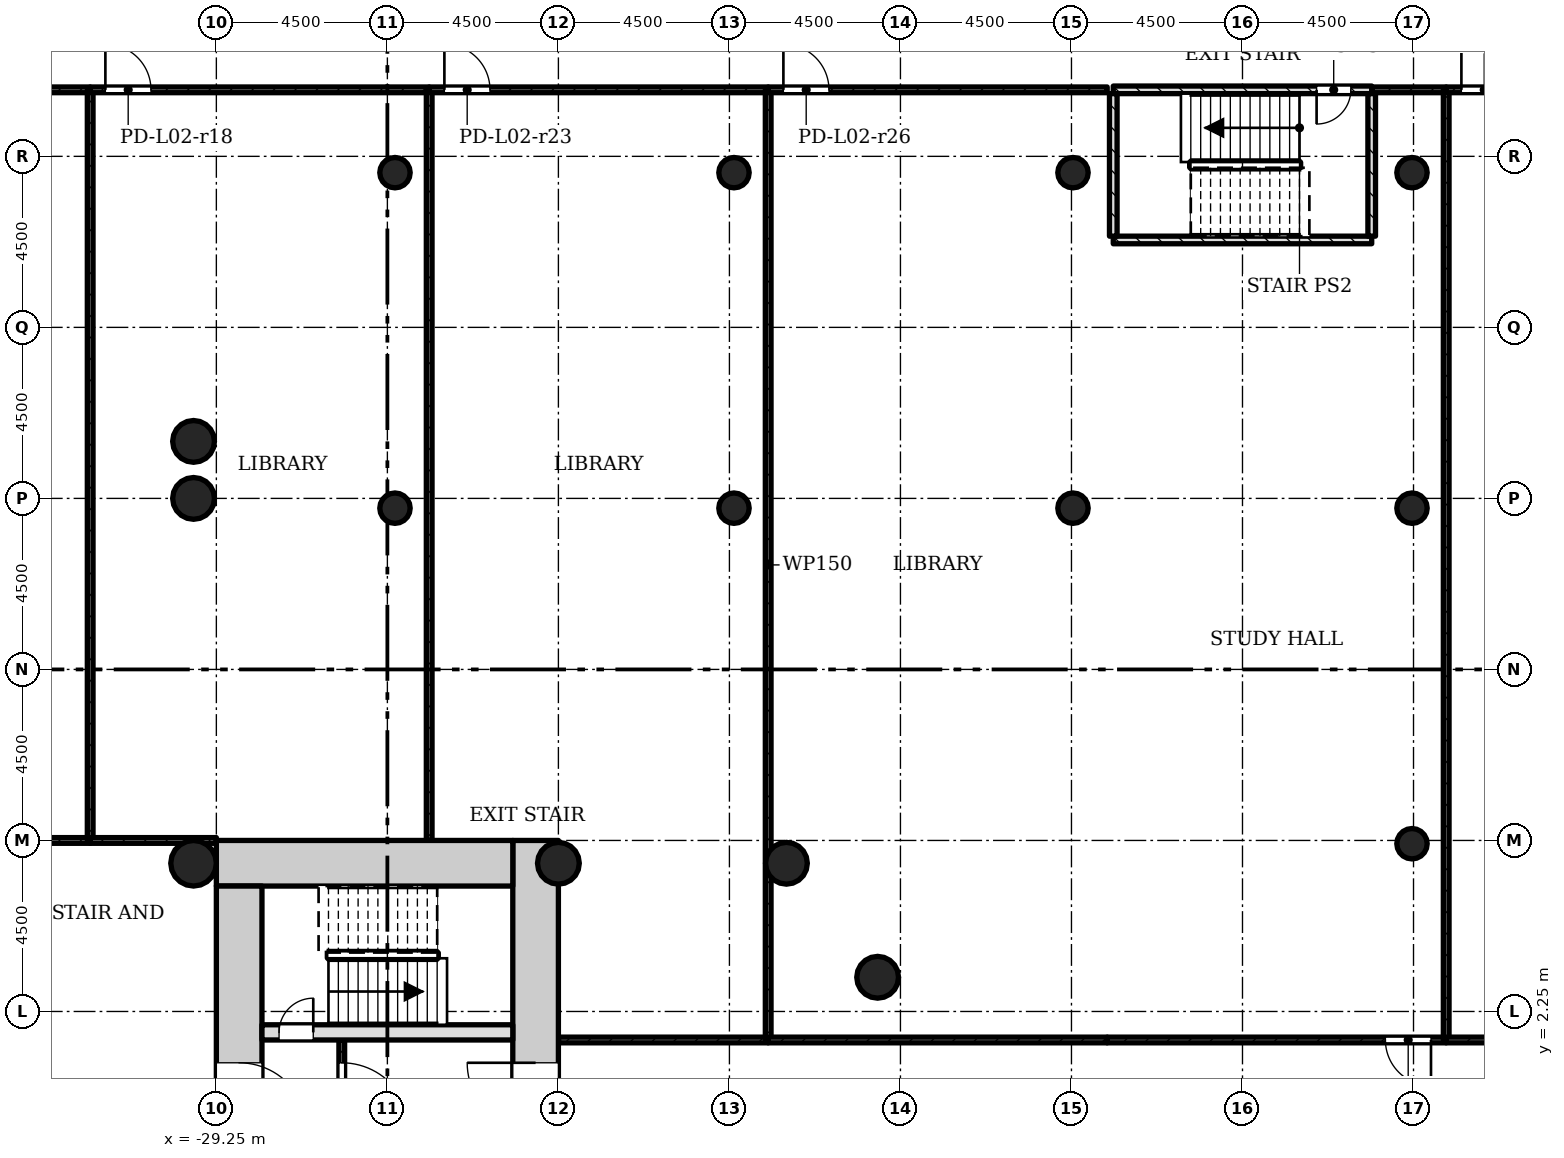
"""IFC4 building model, lengths in metres.
Left out: names, types, materials, properties, quantities, classifications, styles, units other than length and angle.
Written with IfcOpenShell. Run it as: python <this file> out.ifc"""

import sys

from ifc_helpers import new_model, si_unit, direction, frame, frame_2d, origin, origin_2d, place, context, subcontext, project, spatial, rectangle, hollow_circle, extrude, element, fill, save


model = new_model("IFC4")
c1 = context("Model", 3, precision=1e-05, world=origin(), true_north=direction((0.0, 1.0)))
c2 = subcontext(c1, "Body", "Model", "MODEL_VIEW")
j1 = project(units=[si_unit("LENGTHUNIT", "METRE"), si_unit("PLANEANGLEUNIT", "RADIAN")], contexts=[c1])
p1 = place(None, origin())
s1 = spatial("IfcSite", under=j1, at=p1, CompositionType="ELEMENT")
p2 = place(p1, origin())
s2 = spatial("IfcBuilding", under=s1, at=p2, CompositionType="ELEMENT")
p3 = place(p2, frame((0.0, 0.0, 11.0)))
s3 = spatial("IfcBuildingStorey", under=s2, at=p3, CompositionType="ELEMENT", Elevation=11.0)
p4 = place(p3, frame((-20.85, -5.55, 0.0), z_axis=(0.0, 0.0, 1.0), x_axis=(0.0, 1.0, 0.0)))
e1 = element("IfcWall", 1, at=p4, inside=s3, PredefinedType="SHEAR", context=c2, shape_type="SweptSolid", body=[
    extrude(rectangle(XDim=12.3, YDim=1.2, at=frame_2d((6.15, 0.0))), origin(), (0.0, 0.0, 1.0), 4.5),
])
p5 = place(p4, frame((4.65, 0.0, 0.0)))
e2 = element("IfcOpeningElement", 2, at=p5, cuts=e1, PredefinedType="OPENING", context=c2, shape_type="SweptSolid", body=[
    extrude(rectangle(XDim=1.8, YDim=2.1, at=frame_2d((0.9, 1.05))), frame((0.0, 0.61, 0.0), z_axis=(0.0, -1.0, 0.0), x_axis=(1.0, 0.0, 0.0)), (0.0, 0.0, 1.0), 1.22),
])
p6 = place(p3, frame((-21.45, 6.15, 0.0), z_axis=(0.0, 0.0, 1.0), x_axis=(-1.0, 0.0, 0.0)))
e3 = element("IfcWall", 3, at=p6, inside=s3, PredefinedType="SHEAR", context=c2, shape_type="SweptSolid", body=[
    extrude(rectangle(XDim=7.8, YDim=1.2, at=frame_2d((3.9, 0.0))), origin(), (0.0, 0.0, 1.0), 4.5),
])
p7 = place(p3, frame((-28.65, 5.55, 0.0), z_axis=(0.0, 0.0, 1.0), x_axis=(0.0, -1.0, 0.0)))
e4 = element("IfcWall", 4, at=p7, inside=s3, PredefinedType="SHEAR", context=c2, shape_type="SweptSolid", body=[
    extrude(rectangle(XDim=12.3, YDim=1.2, at=frame_2d((6.15, 0.0))), origin(), (0.0, 0.0, 1.0), 4.5),
])
p8 = place(p7, frame((4.65, 0.0, 0.0)))
e5 = element("IfcOpeningElement", 5, at=p8, cuts=e4, PredefinedType="OPENING", context=c2, shape_type="SweptSolid", body=[
    extrude(rectangle(XDim=1.8, YDim=2.1, at=frame_2d((0.9, 1.05))), frame((0.0, 0.61, 0.0), z_axis=(0.0, -1.0, 0.0), x_axis=(1.0, 0.0, 0.0)), (0.0, 0.0, 1.0), 1.22),
])
p9 = place(p3, frame((-28.05, 1.7, 0.0), z_axis=(0.0, 0.0, 1.0), x_axis=(1.0, 0.0, 0.0)))
e6 = element("IfcWall", 6, at=p9, inside=s3, PredefinedType="SHEAR", context=c2, shape_type="SweptSolid", body=[
    extrude(rectangle(XDim=6.6, YDim=0.4, at=frame_2d((3.3, 0.0))), origin(), (0.0, 0.0, 1.0), 4.5),
])
p10 = place(p9, frame((0.45, 0.0, 0.0)))
e7 = element("IfcOpeningElement", 7, at=p10, cuts=e6, PredefinedType="OPENING", context=c2, shape_type="SweptSolid", body=[
    extrude(rectangle(XDim=0.9, YDim=2.1, at=frame_2d((0.45, 1.05))), frame((0.0, 0.21, 0.0), z_axis=(0.0, -1.0, 0.0), x_axis=(1.0, 0.0, 0.0)), (0.0, 0.0, 1.0), 0.42),
])
for number, where, z_axis, x_axis in (
    (8, (-20.25, 6.15, 0.0), (0.0, 0.0, 1.0), (1.0, 0.0, 0.0)),
    (9, (-14.25, 6.15, 0.0), (0.0, 0.0, 1.0), (1.0, 0.0, 0.0)),
    (10, (-11.85, 3.15, 0.0), (0.0, 0.0, 1.0), (1.0, 0.0, 0.0)),
    (11, (-29.85, 15.75, 0.0), (0.0, 0.0, 1.0), (1.0, 0.0, 0.0)),
    (12, (-29.85, 17.25, 0.0), (0.0, 0.0, 1.0), (1.0, 0.0, 0.0)),
):
    element("IfcColumn", number, at=place(p3, frame(where, z_axis=z_axis, x_axis=x_axis)), inside=s3, PredefinedType="COLUMN", context=c2, shape_type="SweptSolid", body=[
        extrude(hollow_circle(Radius=0.55, WallThickness=0.04, at=origin_2d()), origin(), (0.0, 0.0, 1.0), 4.5),
    ])
p11 = place(p3, frame((-29.85, 6.15, 0.0), z_axis=(0.0, 0.0, 1.0), x_axis=(1.0, 0.0, 0.0)))
e13 = element("IfcColumn", 13, at=p11, inside=s3, PredefinedType="COLUMN", context=c2, shape_type="SweptSolid", body=[
    extrude(hollow_circle(Radius=0.6, WallThickness=0.045, at=origin_2d()), origin(), (0.0, 0.0, 1.0), 4.5),
])
for number, where, z_axis, x_axis in (
    (14, (2.21, 6.664, 0.0), (0.0, 0.0, 1.0), (1.0, 0.0, 0.0)),
    (15, (-24.55, 15.493, 0.0), (0.0, 0.0, 1.0), (1.0, 0.0, 0.0)),
    (16, (-15.63, 15.493, 0.0), (0.0, 0.0, 1.0), (1.0, 0.0, 0.0)),
    (17, (-6.71, 15.493, 0.0), (0.0, 0.0, 1.0), (1.0, 0.0, 0.0)),
    (18, (2.21, 15.493, 0.0), (0.0, 0.0, 1.0), (1.0, 0.0, 0.0)),
    (19, (-24.55, 24.321, 0.0), (0.0, 0.0, 1.0), (1.0, 0.0, 0.0)),
    (20, (-15.63, 24.321, 0.0), (0.0, 0.0, 1.0), (1.0, 0.0, 0.0)),
    (21, (-6.71, 24.321, 0.0), (0.0, 0.0, 1.0), (1.0, 0.0, 0.0)),
    (22, (2.21, 24.321, 0.0), (0.0, 0.0, 1.0), (1.0, 0.0, 0.0)),
):
    element("IfcColumn", number, at=place(p3, frame(where, z_axis=z_axis, x_axis=x_axis)), inside=s3, PredefinedType="COLUMN", context=c2, shape_type="SweptSolid", body=[
        extrude(hollow_circle(Radius=0.4, WallThickness=0.028, at=origin_2d()), origin(), (0.0, 0.0, 1.0), 4.5),
    ])
p12 = place(p3, frame((-25.95, -1.5, 0.0), z_axis=(0.0, 0.0, 1.0), x_axis=(0.0, 1.0, 0.0)))
e23 = element("IfcWall", 23, at=p12, inside=s3, PredefinedType="PARTITIONING", context=c2, shape_type="SweptSolid", body=[
    extrude(rectangle(XDim=3.0, YDim=0.15, at=frame_2d((1.5, 0.0))), origin(), (0.0, 0.0, 1.0), 4.08),
])
p13 = place(p12, frame((0.6, 0.0, 0.0)))
e24 = element("IfcOpeningElement", 24, at=p13, cuts=e23, PredefinedType="OPENING", context=c2, shape_type="SweptSolid", body=[
    extrude(rectangle(XDim=1.8, YDim=2.1, at=frame_2d((0.9, 1.05))), frame((0.0, 0.085, 0.0), z_axis=(0.0, -1.0, 0.0), x_axis=(1.0, 0.0, 0.0)), (0.0, 0.0, 1.0), 0.17),
])
p14 = place(p3, frame((-41.49, 26.5, 0.0), z_axis=(0.0, 0.0, 1.0), x_axis=(1.0, 0.0, 0.0)))
e25 = element("IfcWall", 25, at=p14, inside=s3, PredefinedType="PARTITIONING", context=c2, shape_type="SweptSolid", body=[
    extrude(rectangle(XDim=8.92, YDim=0.15, at=frame_2d((4.46, 0.0))), origin(), (0.0, 0.0, 1.0), 4.08),
])
p15 = place(p14, frame((0.4, 0.0, 0.0)))
e26 = element("IfcOpeningElement", 26, at=p15, cuts=e25, PredefinedType="OPENING", context=c2, shape_type="SweptSolid", body=[
    extrude(rectangle(XDim=1.2, YDim=2.1, at=frame_2d((0.6, 1.05))), frame((0.0, 0.085, 0.0), z_axis=(0.0, -1.0, 0.0), x_axis=(1.0, 0.0, 0.0)), (0.0, 0.0, 1.0), 0.17),
])
p16 = place(p3, frame((-32.57, 6.75, 0.0), z_axis=(0.0, 0.0, 1.0), x_axis=(-1.0, 0.0, 0.0)))
e27 = element("IfcWall", 27, at=p16, inside=s3, PredefinedType="PARTITIONING", context=c2, shape_type="SweptSolid", body=[
    extrude(rectangle(XDim=8.92, YDim=0.15, at=frame_2d((4.46, 0.0))), origin(), (0.0, 0.0, 1.0), 4.08),
])
p17 = place(p3, frame((-32.57, 26.5, 0.0), z_axis=(0.0, 0.0, 1.0), x_axis=(0.0, -1.0, 0.0)))
e28 = element("IfcWall", 28, at=p17, inside=s3, PredefinedType="PARTITIONING", context=c2, shape_type="SweptSolid", body=[
    extrude(rectangle(XDim=19.75, YDim=0.15, at=frame_2d((9.875, 0.0))), origin(), (0.0, 0.0, 1.0), 4.08),
])
p18 = place(p3, frame((-29.25, 6.75, 0.0), z_axis=(0.0, 0.0, 1.0), x_axis=(-1.0, 0.0, 0.0)))
e29 = element("IfcWall", 29, at=p18, inside=s3, PredefinedType="PARTITIONING", context=c2, shape_type="SweptSolid", body=[
    extrude(rectangle(XDim=3.32, YDim=0.15, at=frame_2d((1.66, 0.0))), origin(), (0.0, 0.0, 1.0), 4.08),
])
p19 = place(p3, frame((-32.57, 26.5, 0.0), z_axis=(0.0, 0.0, 1.0), x_axis=(1.0, 0.0, 0.0)))
e30 = element("IfcWall", 30, at=p19, inside=s3, PredefinedType="PARTITIONING", context=c2, shape_type="SweptSolid", body=[
    extrude(rectangle(XDim=8.92, YDim=0.15, at=frame_2d((4.46, 0.0))), origin(), (0.0, 0.0, 1.0), 4.08),
])
p20 = place(p19, frame((0.4, 0.0, 0.0)))
e31 = element("IfcOpeningElement", 31, at=p20, cuts=e30, PredefinedType="OPENING", context=c2, shape_type="SweptSolid", body=[
    extrude(rectangle(XDim=1.2, YDim=2.1, at=frame_2d((0.6, 1.05))), frame((0.0, 0.085, 0.0), z_axis=(0.0, -1.0, 0.0), x_axis=(1.0, 0.0, 0.0)), (0.0, 0.0, 1.0), 0.17),
])
p21 = place(p3, frame((-23.65, 26.5, 0.0), z_axis=(0.0, 0.0, 1.0), x_axis=(0.0, -1.0, 0.0)))
e32 = element("IfcWall", 32, at=p21, inside=s3, PredefinedType="PARTITIONING", context=c2, shape_type="SweptSolid", body=[
    extrude(rectangle(XDim=19.75, YDim=0.15, at=frame_2d((9.875, 0.0))), origin(), (0.0, 0.0, 1.0), 4.08),
])
p22 = place(p3, frame((-23.65, 26.5, 0.0), z_axis=(0.0, 0.0, 1.0), x_axis=(1.0, 0.0, 0.0)))
e33 = element("IfcWall", 33, at=p22, inside=s3, PredefinedType="PARTITIONING", context=c2, shape_type="SweptSolid", body=[
    extrude(rectangle(XDim=8.92, YDim=0.15, at=frame_2d((4.46, 0.0))), origin(), (0.0, 0.0, 1.0), 4.08),
])
p23 = place(p22, frame((0.4, 0.0, 0.0)))
e34 = element("IfcOpeningElement", 34, at=p23, cuts=e33, PredefinedType="OPENING", context=c2, shape_type="SweptSolid", body=[
    extrude(rectangle(XDim=1.2, YDim=2.1, at=frame_2d((0.6, 1.05))), frame((0.0, 0.085, 0.0), z_axis=(0.0, -1.0, 0.0), x_axis=(1.0, 0.0, 0.0)), (0.0, 0.0, 1.0), 0.17),
])
p24 = place(p3, frame((-14.73, 1.5, 0.0), z_axis=(0.0, 0.0, 1.0), x_axis=(-1.0, 0.0, 0.0)))
e35 = element("IfcWall", 35, at=p24, inside=s3, PredefinedType="PARTITIONING", context=c2, shape_type="SweptSolid", body=[
    extrude(rectangle(XDim=5.52, YDim=0.15, at=frame_2d((2.76, 0.0))), origin(), (0.0, 0.0, 1.0), 4.08),
])
p25 = place(p3, frame((-14.73, 26.5, 0.0), z_axis=(0.0, 0.0, 1.0), x_axis=(0.0, -1.0, 0.0)))
e36 = element("IfcWall", 36, at=p25, inside=s3, PredefinedType="PARTITIONING", context=c2, shape_type="SweptSolid", body=[
    extrude(rectangle(XDim=25.0, YDim=0.15, at=frame_2d((12.5, 0.0))), origin(), (0.0, 0.0, 1.0), 4.08),
])
p26 = place(p3, frame((-14.73, 26.5, 0.0), z_axis=(0.0, 0.0, 1.0), x_axis=(1.0, 0.0, 0.0)))
e37 = element("IfcWall", 37, at=p26, inside=s3, PredefinedType="PARTITIONING", context=c2, shape_type="SweptSolid", body=[
    extrude(rectangle(XDim=8.92, YDim=0.15, at=frame_2d((4.46, 0.0))), origin(), (0.0, 0.0, 1.0), 4.08),
])
p27 = place(p26, frame((0.4, 0.0, 0.0)))
e38 = element("IfcOpeningElement", 38, at=p27, cuts=e37, PredefinedType="OPENING", context=c2, shape_type="SweptSolid", body=[
    extrude(rectangle(XDim=1.2, YDim=2.1, at=frame_2d((0.6, 1.05))), frame((0.0, 0.085, 0.0), z_axis=(0.0, -1.0, 0.0), x_axis=(1.0, 0.0, 0.0)), (0.0, 0.0, 1.0), 0.17),
])
p28 = place(p3, frame((-5.81, 1.5, 0.0), z_axis=(0.0, 0.0, 1.0), x_axis=(-1.0, 0.0, 0.0)))
e39 = element("IfcWall", 39, at=p28, inside=s3, PredefinedType="PARTITIONING", context=c2, shape_type="SweptSolid", body=[
    extrude(rectangle(XDim=8.92, YDim=0.15, at=frame_2d((4.46, 0.0))), origin(), (0.0, 0.0, 1.0), 4.08),
])
p29 = place(p3, frame((-5.65, 26.5, 0.0), z_axis=(0.0, 0.0, 1.0), x_axis=(1.0, 0.0, 0.0)))
e40 = element("IfcWall", 40, at=p29, inside=s3, PredefinedType="SHEAR", context=c2, shape_type="SweptSolid", body=[
    extrude(rectangle(XDim=6.8, YDim=0.2, at=frame_2d((3.4, 0.0))), origin(), (0.0, 0.0, 1.0), 4.08),
])
p30 = place(p29, frame((5.35, 0.0, 0.0)))
e41 = element("IfcOpeningElement", 41, at=p30, cuts=e40, PredefinedType="OPENING", context=c2, shape_type="SweptSolid", body=[
    extrude(rectangle(XDim=0.9, YDim=2.1, at=frame_2d((0.45, 1.05))), frame((0.0, 0.11, 0.0), z_axis=(0.0, -1.0, 0.0), x_axis=(1.0, 0.0, 0.0)), (0.0, 0.0, 1.0), 0.22),
])
p31 = place(p3, frame((-5.65, 22.55, 0.0), z_axis=(0.0, 0.0, 1.0), x_axis=(1.0, 0.0, 0.0)))
e42 = element("IfcWall", 42, at=p31, inside=s3, PredefinedType="SHEAR", context=c2, shape_type="SweptSolid", body=[
    extrude(rectangle(XDim=6.8, YDim=0.2, at=frame_2d((3.4, 0.0))), origin(), (0.0, 0.0, 1.0), 4.08),
])
for number, where, z_axis, x_axis in (
    (43, (-5.65, 22.65, 0.0), (0.0, 0.0, 1.0), (0.0, 1.0, 0.0)),
    (44, (1.15, 22.65, 0.0), (0.0, 0.0, 1.0), (0.0, 1.0, 0.0)),
):
    element("IfcWall", number, at=place(p3, frame(where, z_axis=z_axis, x_axis=x_axis)), inside=s3, PredefinedType="SHEAR", context=c2, shape_type="SweptSolid", body=[
        extrude(rectangle(XDim=3.75, YDim=0.2, at=frame_2d((1.875, 0.0))), origin(), (0.0, 0.0, 1.0), 4.08),
    ])
p32 = place(p3, frame((1.15, 26.5, 0.0), z_axis=(0.0, 0.0, 1.0), x_axis=(1.0, 0.0, 0.0)))
e45 = element("IfcWall", 45, at=p32, inside=s3, PredefinedType="PARTITIONING", context=c2, shape_type="SweptSolid", body=[
    extrude(rectangle(XDim=1.96, YDim=0.15, at=frame_2d((0.98, 0.0))), origin(), (0.0, 0.0, 1.0), 4.08),
])
p33 = place(p3, frame((3.11, 1.5, 0.0), z_axis=(0.0, 0.0, 1.0), x_axis=(-1.0, 0.0, 0.0)))
e46 = element("IfcWall", 46, at=p33, inside=s3, PredefinedType="PARTITIONING", context=c2, shape_type="SweptSolid", body=[
    extrude(rectangle(XDim=8.92, YDim=0.15, at=frame_2d((4.46, 0.0))), origin(), (0.0, 0.0, 1.0), 4.08),
])
p34 = place(p33, frame((0.4, 0.0, 0.0)))
e47 = element("IfcOpeningElement", 47, at=p34, cuts=e46, PredefinedType="OPENING", context=c2, shape_type="SweptSolid", body=[
    extrude(rectangle(XDim=1.2, YDim=2.1, at=frame_2d((0.6, 1.05))), frame((0.0, 0.085, 0.0), z_axis=(0.0, -1.0, 0.0), x_axis=(1.0, 0.0, 0.0)), (0.0, 0.0, 1.0), 0.17),
])
p35 = place(p3, frame((3.11, 26.5, 0.0), z_axis=(0.0, 0.0, 1.0), x_axis=(0.0, -1.0, 0.0)))
e48 = element("IfcWall", 48, at=p35, inside=s3, PredefinedType="PARTITIONING", context=c2, shape_type="SweptSolid", body=[
    extrude(rectangle(XDim=25.0, YDim=0.15, at=frame_2d((12.5, 0.0))), origin(), (0.0, 0.0, 1.0), 4.08),
])
p36 = place(p3, frame((8.03, 1.5, 0.0), z_axis=(0.0, 0.0, 1.0), x_axis=(-1.0, 0.0, 0.0)))
e49 = element("IfcWall", 49, at=p36, inside=s3, PredefinedType="PARTITIONING", context=c2, shape_type="SweptSolid", body=[
    extrude(rectangle(XDim=4.92, YDim=0.15, at=frame_2d((2.46, 0.0))), origin(), (0.0, 0.0, 1.0), 4.08),
])
p37 = place(p3, frame((3.11, 26.5, 0.0), z_axis=(0.0, 0.0, 1.0), x_axis=(1.0, 0.0, 0.0)))
e50 = element("IfcWall", 50, at=p37, inside=s3, PredefinedType="PARTITIONING", context=c2, shape_type="SweptSolid", body=[
    extrude(rectangle(XDim=8.92, YDim=0.15, at=frame_2d((4.46, 0.0))), origin(), (0.0, 0.0, 1.0), 4.08),
])
p38 = place(p37, frame((0.4, 0.0, 0.0)))
e51 = element("IfcOpeningElement", 51, at=p38, cuts=e50, PredefinedType="OPENING", context=c2, shape_type="SweptSolid", body=[
    extrude(rectangle(XDim=1.2, YDim=2.1, at=frame_2d((0.6, 1.05))), frame((0.0, 0.085, 0.0), z_axis=(0.0, -1.0, 0.0), x_axis=(1.0, 0.0, 0.0)), (0.0, 0.0, 1.0), 0.17),
])
p39 = place(p13, origin())
e52 = element("IfcDoor", 52, at=p39, inside=s3, OperationType="SINGLE_SWING_LEFT", PredefinedType="DOOR", context=c2, shape_type="SweptSolid", body=[
    extrude(rectangle(XDim=1.8, YDim=2.1, at=frame_2d((0.9, 1.05))), frame((0.0, 0.025, 0.0), z_axis=(0.0, -1.0, 0.0), x_axis=(1.0, 0.0, 0.0)), (0.0, 0.0, 1.0), 0.05),
])
fill(e24, e52)
p40 = place(p20, origin())
e53 = element("IfcDoor", 53, at=p40, inside=s3, OperationType="SINGLE_SWING_RIGHT", PredefinedType="DOOR", context=c2, shape_type="SweptSolid", body=[
    extrude(rectangle(XDim=1.2, YDim=2.1, at=frame_2d((0.6, 1.05))), frame((0.0, 0.025, 0.0), z_axis=(0.0, -1.0, 0.0), x_axis=(1.0, 0.0, 0.0)), (0.0, 0.0, 1.0), 0.05),
])
fill(e31, e53)
p41 = place(p23, origin())
e54 = element("IfcDoor", 54, at=p41, inside=s3, OperationType="SINGLE_SWING_RIGHT", PredefinedType="DOOR", context=c2, shape_type="SweptSolid", body=[
    extrude(rectangle(XDim=1.2, YDim=2.1, at=frame_2d((0.6, 1.05))), frame((0.0, 0.025, 0.0), z_axis=(0.0, -1.0, 0.0), x_axis=(1.0, 0.0, 0.0)), (0.0, 0.0, 1.0), 0.05),
])
fill(e34, e54)
p42 = place(p27, origin())
e55 = element("IfcDoor", 55, at=p42, inside=s3, OperationType="SINGLE_SWING_RIGHT", PredefinedType="DOOR", context=c2, shape_type="SweptSolid", body=[
    extrude(rectangle(XDim=1.2, YDim=2.1, at=frame_2d((0.6, 1.05))), frame((0.0, 0.025, 0.0), z_axis=(0.0, -1.0, 0.0), x_axis=(1.0, 0.0, 0.0)), (0.0, 0.0, 1.0), 0.05),
])
fill(e38, e55)
p43 = place(p30, origin())
e56 = element("IfcDoor", 56, at=p43, inside=s3, OperationType="SINGLE_SWING_LEFT", PredefinedType="DOOR", context=c2, shape_type="SweptSolid", body=[
    extrude(rectangle(XDim=0.9, YDim=2.1, at=frame_2d((0.45, 1.05))), frame((0.0, 0.025, 0.0), z_axis=(0.0, -1.0, 0.0), x_axis=(1.0, 0.0, 0.0)), (0.0, 0.0, 1.0), 0.05),
])
fill(e41, e56)
p44 = place(p10, origin())
e57 = element("IfcDoor", 57, at=p44, inside=s3, OperationType="SINGLE_SWING_LEFT", PredefinedType="DOOR", context=c2, shape_type="SweptSolid", body=[
    extrude(rectangle(XDim=0.9, YDim=2.1, at=frame_2d((0.45, 1.05))), frame((0.0, 0.025, 0.0), z_axis=(0.0, -1.0, 0.0), x_axis=(1.0, 0.0, 0.0)), (0.0, 0.0, 1.0), 0.05),
])
fill(e7, e57)
p45 = place(p8, origin())
e58 = element("IfcDoor", 58, at=p45, inside=s3, OperationType="SINGLE_SWING_LEFT", PredefinedType="DOOR", context=c2, shape_type="SweptSolid", body=[
    extrude(rectangle(XDim=1.8, YDim=2.1, at=frame_2d((0.9, 1.05))), frame((0.0, 0.025, 0.0), z_axis=(0.0, -1.0, 0.0), x_axis=(1.0, 0.0, 0.0)), (0.0, 0.0, 1.0), 0.05),
])
fill(e5, e58)
p46 = place(p5, origin())
e59 = element("IfcDoor", 59, at=p46, inside=s3, OperationType="SINGLE_SWING_LEFT", PredefinedType="DOOR", context=c2, shape_type="SweptSolid", body=[
    extrude(rectangle(XDim=1.8, YDim=2.1, at=frame_2d((0.9, 1.05))), frame((0.0, 0.025, 0.0), z_axis=(0.0, -1.0, 0.0), x_axis=(1.0, 0.0, 0.0)), (0.0, 0.0, 1.0), 0.05),
])
fill(e2, e59)
p47 = place(p34, origin())
e60 = element("IfcDoor", 60, at=p47, inside=s3, OperationType="SINGLE_SWING_RIGHT", PredefinedType="DOOR", context=c2, shape_type="SweptSolid", body=[
    extrude(rectangle(XDim=1.2, YDim=2.1, at=frame_2d((0.6, 1.05))), frame((0.0, 0.025, 0.0), z_axis=(0.0, -1.0, 0.0), x_axis=(1.0, 0.0, 0.0)), (0.0, 0.0, 1.0), 0.05),
])
fill(e47, e60)
p48 = place(p38, origin())
e61 = element("IfcDoor", 61, at=p48, inside=s3, OperationType="SINGLE_SWING_RIGHT", PredefinedType="DOOR", context=c2, shape_type="SweptSolid", body=[
    extrude(rectangle(XDim=1.2, YDim=2.1, at=frame_2d((0.6, 1.05))), frame((0.0, 0.025, 0.0), z_axis=(0.0, -1.0, 0.0), x_axis=(1.0, 0.0, 0.0)), (0.0, 0.0, 1.0), 0.05),
])
fill(e51, e61)
save(model, sys.argv[1])
